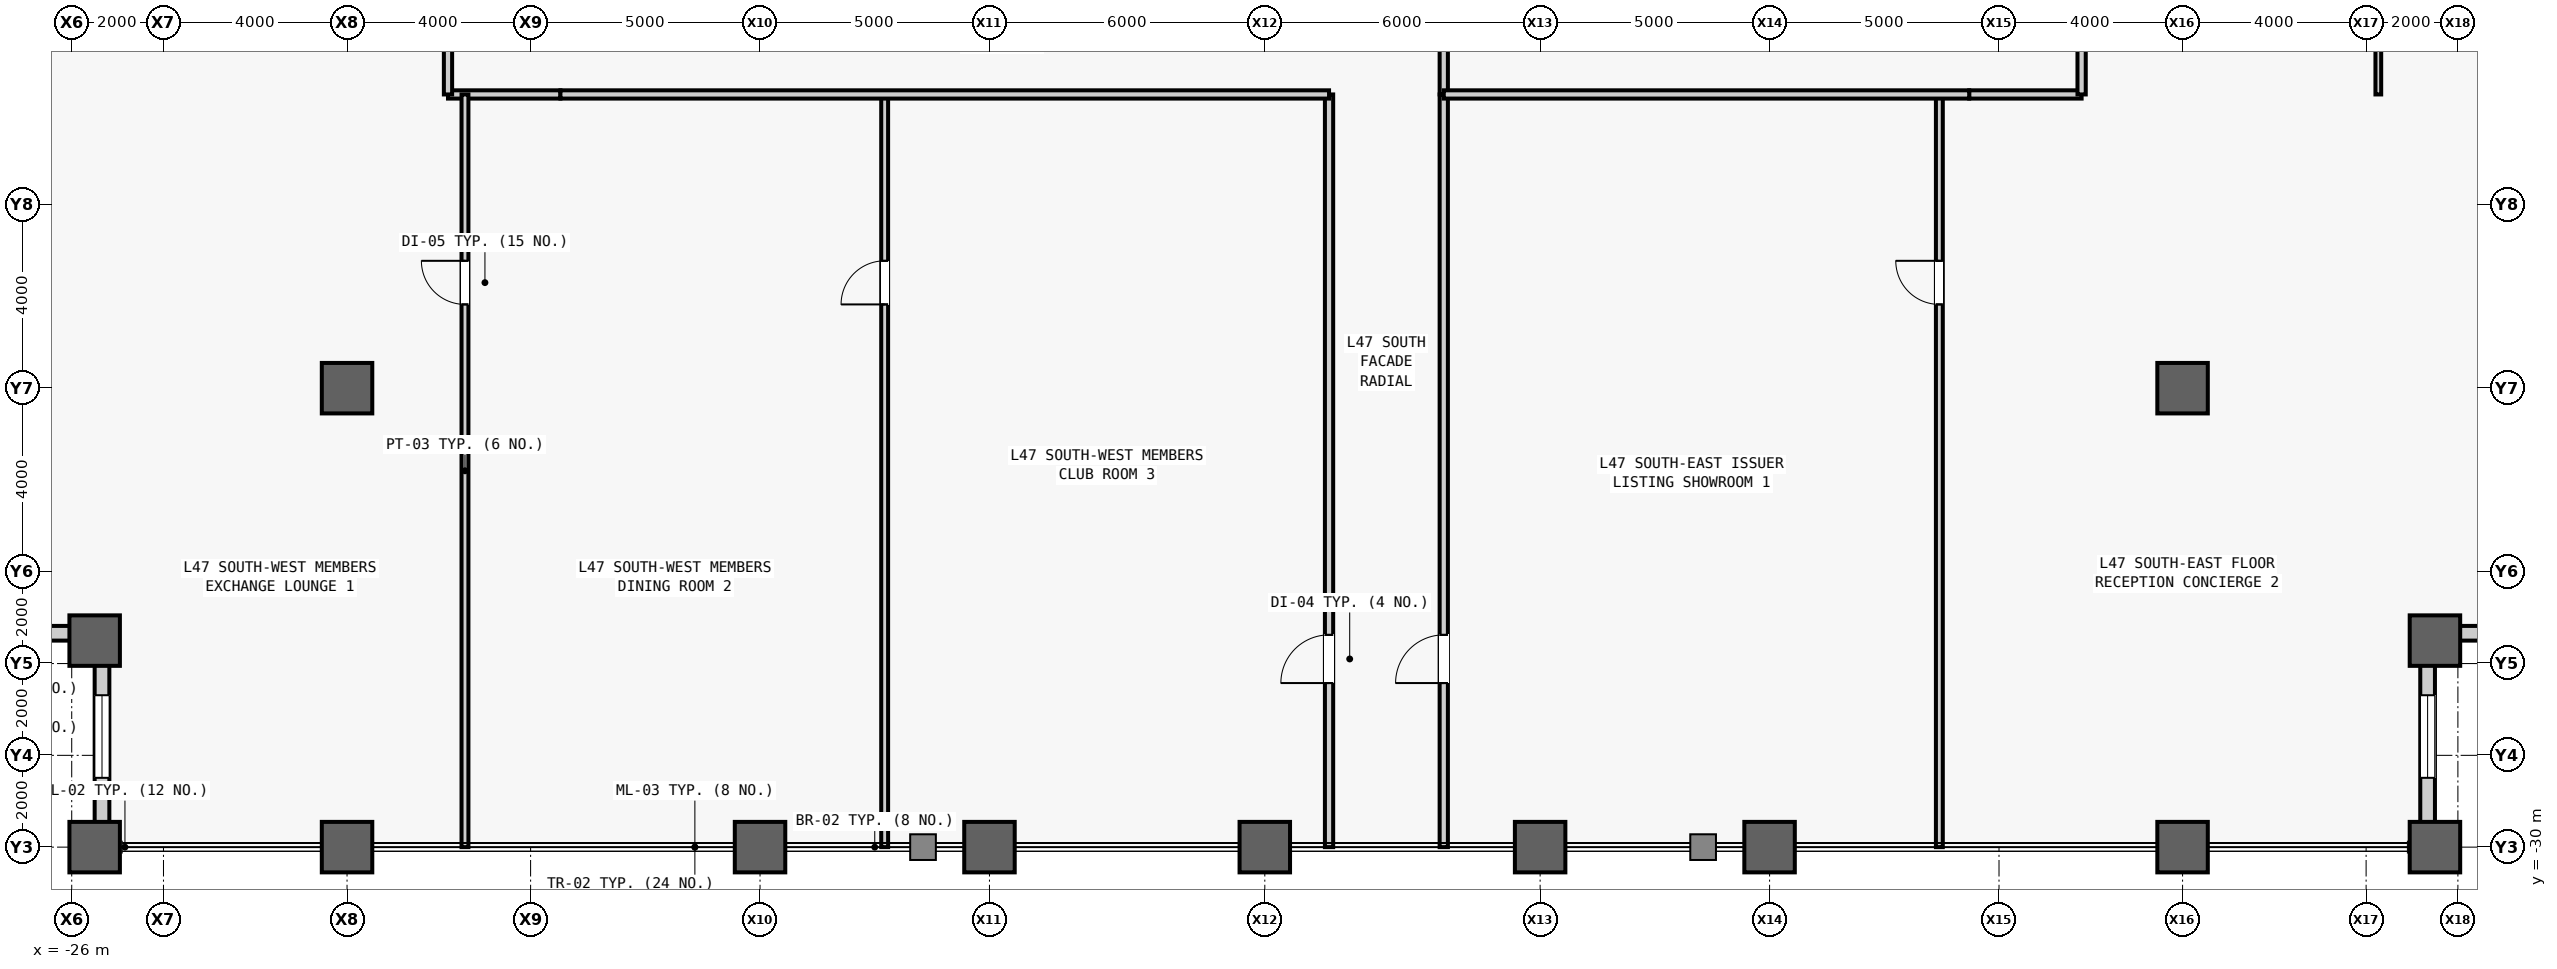
"""IFC4 building model, lengths in metres.
Left out: names, types, materials, properties, quantities, classifications, styles, units other than length and angle.
Written with IfcOpenShell. Run it as: python <this file> out.ifc"""

import sys

from ifc_helpers import new_model, si_unit, direction, frame, frame_2d, origin, origin_2d, place, context, subcontext, project, spatial, rectangle, hollow_rectangle, extrude, source, transform, mapped, element, fill, save


model = new_model("IFC4")
c1 = context("Model", 3, precision=1e-05, world=origin(), true_north=direction((0.0, 1.0)))
c2 = subcontext(c1, "Body", "Model", "MODEL_VIEW")
j1 = project(units=[si_unit("LENGTHUNIT", "METRE"), si_unit("PLANEANGLEUNIT", "RADIAN")], contexts=[c1])
p1 = place(None, origin())
s1 = spatial("IfcSite", under=j1, at=p1, CompositionType="ELEMENT")
p2 = place(p1, origin())
s2 = spatial("IfcBuilding", under=s1, at=p2, CompositionType="ELEMENT")
p3 = place(p2, frame((0.0, 0.0, 203.1)))
s3 = spatial("IfcBuildingStorey", under=s2, at=p3, CompositionType="ELEMENT", Elevation=203.1)
m1 = source(origin(), c2, "Body", "SweptSolid", [
    extrude(hollow_rectangle(XDim=1.1, YDim=1.1, WallThickness=0.06, at=origin_2d()), origin(), (0.0, 0.0, 1.0), 4.0),
])
for number, where, z_axis, x_axis in (
    (1, (-25.5, -30.0, 0.0), (0.0, 0.0, 1.0), (1.0, 0.0, 0.0)),
    (2, (-25.5, -25.5, 0.0), (0.0, 0.0, 1.0), (1.0, 0.0, 0.0)),
    (3, (-20.0, -30.0, 0.0), (0.0, 0.0, 1.0), (1.0, 0.0, 0.0)),
    (4, (-20.0, -20.0, 0.0), (0.0, 0.0, 1.0), (1.0, 0.0, 0.0)),
    (5, (-11.0, -30.0, 0.0), (0.0, 0.0, 1.0), (1.0, 0.0, 0.0)),
    (6, (-6.0, -30.0, 0.0), (0.0, 0.0, 1.0), (1.0, 0.0, 0.0)),
    (7, (0.0, -30.0, 0.0), (0.0, 0.0, 1.0), (1.0, 0.0, 0.0)),
    (8, (6.0, -30.0, 0.0), (0.0, 0.0, 1.0), (1.0, 0.0, 0.0)),
    (9, (11.0, -30.0, 0.0), (0.0, 0.0, 1.0), (1.0, 0.0, 0.0)),
    (10, (20.0, -30.0, 0.0), (0.0, 0.0, 1.0), (1.0, 0.0, 0.0)),
    (11, (20.0, -20.0, 0.0), (0.0, 0.0, 1.0), (1.0, 0.0, 0.0)),
    (12, (25.5, -30.0, 0.0), (0.0, 0.0, 1.0), (1.0, 0.0, 0.0)),
    (13, (25.5, -25.5, 0.0), (0.0, 0.0, 1.0), (1.0, 0.0, 0.0)),
):
    element("IfcColumn", number, at=place(p3, frame(where, z_axis=z_axis, x_axis=x_axis)), inside=s3, PredefinedType="COLUMN", context=c2, shape_type="MappedRepresentation", body=[
        mapped(m1, transform((0.0, 0.0, 0.0), scale=1.0)),
    ])
m2 = source(origin(), c2, "Body", "SweptSolid", [
    extrude(rectangle(XDim=4.18, YDim=0.32, at=frame_2d((2.09, 0.0))), origin(), (0.0, 0.0, 1.0), 3.164),
])
p4 = place(p3, frame((-25.5, -25.34, 0.0), z_axis=(0.0, 0.0, 1.0), x_axis=(-1.0, 0.0, 0.0)))
e14 = element("IfcWall", 14, at=p4, inside=s3, PredefinedType="STANDARD", context=c2, shape_type="MappedRepresentation", body=[
    mapped(m2, transform((0.0, 0.0, 0.0), scale=1.0)),
])
m3 = source(origin(), c2, "Body", "SweptSolid", [
    extrude(rectangle(XDim=1.8, YDim=2.4, at=frame_2d((0.9, 1.2))), frame((0.0, 0.17, 0.0), z_axis=(0.0, -1.0, 0.0), x_axis=(1.0, 0.0, 0.0)), (0.0, 0.0, 1.0), 0.34),
])
p5 = place(p4, frame((1.19, 0.0, 0.5)))
e15 = element("IfcOpeningElement", 15, at=p5, cuts=e14, PredefinedType="OPENING", context=c2, shape_type="MappedRepresentation", body=[
    mapped(m3, transform((0.0, 0.0, 0.0), scale=1.0)),
])
p6 = place(p3, frame((-25.34, -29.68, 0.0), z_axis=(0.0, 0.0, 1.0), x_axis=(0.0, 1.0, 0.0)))
e16 = element("IfcWall", 16, at=p6, inside=s3, PredefinedType="STANDARD", context=c2, shape_type="MappedRepresentation", body=[
    mapped(m2, transform((0.0, 0.0, 0.0), scale=1.0)),
])
p7 = place(p6, frame((1.19, 0.0, 0.5)))
e17 = element("IfcOpeningElement", 17, at=p7, cuts=e16, PredefinedType="OPENING", context=c2, shape_type="MappedRepresentation", body=[
    mapped(m3, transform((0.0, 0.0, 0.0), scale=1.0)),
])
p8 = place(p3, frame((25.34, -29.68, 0.0), z_axis=(0.0, 0.0, 1.0), x_axis=(0.0, 1.0, 0.0)))
e18 = element("IfcWall", 18, at=p8, inside=s3, PredefinedType="STANDARD", context=c2, shape_type="MappedRepresentation", body=[
    mapped(m2, transform((0.0, 0.0, 0.0), scale=1.0)),
])
p9 = place(p8, frame((1.19, 0.0, 0.5)))
e19 = element("IfcOpeningElement", 19, at=p9, cuts=e18, PredefinedType="OPENING", context=c2, shape_type="MappedRepresentation", body=[
    mapped(m3, transform((0.0, 0.0, 0.0), scale=1.0)),
])
p10 = place(p3, frame((25.5, -25.34, 0.0), z_axis=(0.0, 0.0, 1.0), x_axis=(1.0, 0.0, 0.0)))
e20 = element("IfcWall", 20, at=p10, inside=s3, PredefinedType="STANDARD", context=c2, shape_type="MappedRepresentation", body=[
    mapped(m2, transform((0.0, 0.0, 0.0), scale=1.0)),
])
p11 = place(p10, frame((1.19, 0.0, 0.5)))
e21 = element("IfcOpeningElement", 21, at=p11, cuts=e20, PredefinedType="OPENING", context=c2, shape_type="MappedRepresentation", body=[
    mapped(m3, transform((0.0, 0.0, 0.0), scale=1.0)),
])
m4 = source(origin(), c2, "Body", "SweptSolid", [
    extrude(rectangle(XDim=2.45, YDim=0.18, at=frame_2d((1.225, 0.0))), origin(), (0.0, 0.0, 1.0), 3.78),
])
for number, where, z_axis, x_axis in (
    (22, (15.35, -13.6, 0.0), (0.0, 0.0, 1.0), (1.0, 0.0, 0.0)),
    (23, (-17.8, -13.6, 0.0), (0.0, 0.0, 1.0), (1.0, 0.0, 0.0)),
):
    element("IfcWall", number, at=place(p3, frame(where, z_axis=z_axis, x_axis=x_axis)), inside=s3, PredefinedType="PARTITIONING", context=c2, shape_type="MappedRepresentation", body=[
        mapped(m4, transform((0.0, 0.0, 0.0), scale=1.0)),
    ])
m5 = source(origin(), c2, "Body", "SweptSolid", [
    extrude(rectangle(XDim=2.6, YDim=0.18, at=frame_2d((1.3, 0.0))), origin(), (0.0, 0.0, 1.0), 3.78),
])
p12 = place(p3, frame((3.9, -13.6, 0.0), z_axis=(0.0, 0.0, 1.0), x_axis=(0.0, 1.0, 0.0)))
e24 = element("IfcWall", 24, at=p12, inside=s3, PredefinedType="PARTITIONING", context=c2, shape_type="MappedRepresentation", body=[
    mapped(m5, transform((0.0, 0.0, 0.0), scale=1.0)),
])
m6 = source(origin(), c2, "Body", "SweptSolid", [
    extrude(rectangle(XDim=16.4, YDim=0.15, at=frame_2d((8.2, 0.0))), origin(), (0.0, 0.0, 1.0), 3.78),
])
p13 = place(p3, frame((-17.43, -30.0, 0.0), z_axis=(0.0, 0.0, 1.0), x_axis=(0.0, 1.0, 0.0)))
e25 = element("IfcWall", 25, at=p13, inside=s3, PredefinedType="PARTITIONING", context=c2, shape_type="MappedRepresentation", body=[
    mapped(m6, transform((0.0, 0.0, 0.0), scale=1.0)),
])
m7 = source(origin(), c2, "Body", "SweptSolid", [
    extrude(rectangle(XDim=0.95, YDim=2.15, at=frame_2d((0.475, 1.075))), frame((0.0, 0.085, 0.0), z_axis=(0.0, -1.0, 0.0), x_axis=(1.0, 0.0, 0.0)), (0.0, 0.0, 1.0), 0.17),
])
p14 = place(p13, frame((11.825, 0.0, 0.0)))
e26 = element("IfcOpeningElement", 26, at=p14, cuts=e25, PredefinedType="OPENING", context=c2, shape_type="MappedRepresentation", body=[
    mapped(m7, transform((0.0, 0.0, 0.0), scale=1.0)),
])
p15 = place(p3, frame((-8.284, -30.0, 0.0), z_axis=(0.0, 0.0, 1.0), x_axis=(0.0, 1.0, 0.0)))
e27 = element("IfcWall", 27, at=p15, inside=s3, PredefinedType="PARTITIONING", context=c2, shape_type="MappedRepresentation", body=[
    mapped(m6, transform((0.0, 0.0, 0.0), scale=1.0)),
])
p16 = place(p15, frame((11.825, 0.0, 0.0)))
e28 = element("IfcOpeningElement", 28, at=p16, cuts=e27, PredefinedType="OPENING", context=c2, shape_type="MappedRepresentation", body=[
    mapped(m7, transform((0.0, 0.0, 0.0), scale=1.0)),
])
m8 = source(origin(), c2, "Body", "SweptSolid", [
    extrude(rectangle(XDim=16.4, YDim=0.18, at=frame_2d((8.2, 0.0))), origin(), (0.0, 0.0, 1.0), 3.78),
])
p17 = place(p3, frame((1.4, -30.0, 0.0), z_axis=(0.0, 0.0, 1.0), x_axis=(0.0, 1.0, 0.0)))
e29 = element("IfcWall", 29, at=p17, inside=s3, PredefinedType="PARTITIONING", context=c2, shape_type="MappedRepresentation", body=[
    mapped(m8, transform((0.0, 0.0, 0.0), scale=1.0)),
])
m9 = source(origin(), c2, "Body", "SweptSolid", [
    extrude(rectangle(XDim=1.05, YDim=2.2, at=frame_2d((0.525, 1.1))), frame((0.0, 0.1, 0.0), z_axis=(0.0, -1.0, 0.0), x_axis=(1.0, 0.0, 0.0)), (0.0, 0.0, 1.0), 0.2),
])
p18 = place(p17, frame((3.575, 0.0, 0.0)))
e30 = element("IfcOpeningElement", 30, at=p18, cuts=e29, PredefinedType="OPENING", context=c2, shape_type="MappedRepresentation", body=[
    mapped(m9, transform((0.0, 0.0, 0.0), scale=1.0)),
])
m10 = source(origin(), c2, "Body", "SweptSolid", [
    extrude(rectangle(XDim=16.75, YDim=0.18, at=frame_2d((8.375, 0.0))), origin(), (0.0, 0.0, 1.0), 3.78),
])
p19 = place(p3, frame((-15.35, -13.6, 0.0), z_axis=(0.0, 0.0, 1.0), x_axis=(1.0, 0.0, 0.0)))
e31 = element("IfcWall", 31, at=p19, inside=s3, PredefinedType="PARTITIONING", context=c2, shape_type="MappedRepresentation", body=[
    mapped(m10, transform((0.0, 0.0, 0.0), scale=1.0)),
])
p20 = place(p3, frame((14.7, -30.0, 0.0), z_axis=(0.0, 0.0, 1.0), x_axis=(0.0, 1.0, 0.0)))
e32 = element("IfcWall", 32, at=p20, inside=s3, PredefinedType="PARTITIONING", context=c2, shape_type="MappedRepresentation", body=[
    mapped(m6, transform((0.0, 0.0, 0.0), scale=1.0)),
])
p21 = place(p20, frame((11.825, 0.0, 0.0)))
e33 = element("IfcOpeningElement", 33, at=p21, cuts=e32, PredefinedType="OPENING", context=c2, shape_type="MappedRepresentation", body=[
    mapped(m7, transform((0.0, 0.0, 0.0), scale=1.0)),
])
p22 = place(p3, frame((3.9, -30.0, 0.0), z_axis=(0.0, 0.0, 1.0), x_axis=(0.0, 1.0, 0.0)))
e34 = element("IfcWall", 34, at=p22, inside=s3, PredefinedType="PARTITIONING", context=c2, shape_type="MappedRepresentation", body=[
    mapped(m8, transform((0.0, 0.0, 0.0), scale=1.0)),
])
p23 = place(p22, frame((3.575, 0.0, 0.0)))
e35 = element("IfcOpeningElement", 35, at=p23, cuts=e34, PredefinedType="OPENING", context=c2, shape_type="MappedRepresentation", body=[
    mapped(m9, transform((0.0, 0.0, 0.0), scale=1.0)),
])
m11 = source(origin(), c2, "Body", "SweptSolid", [
    extrude(rectangle(XDim=11.45, YDim=0.18, at=frame_2d((5.725, 0.0))), origin(), (0.0, 0.0, 1.0), 3.78),
])
p24 = place(p3, frame((3.9, -13.6, 0.0), z_axis=(0.0, 0.0, 1.0), x_axis=(1.0, 0.0, 0.0)))
e36 = element("IfcWall", 36, at=p24, inside=s3, PredefinedType="PARTITIONING", context=c2, shape_type="MappedRepresentation", body=[
    mapped(m11, transform((0.0, 0.0, 0.0), scale=1.0)),
])
m12 = source(origin(), c2, "Body", "SweptSolid", [
    extrude(rectangle(XDim=11.6, YDim=0.18, at=frame_2d((5.8, 0.0))), origin(), (0.0, 0.0, 1.0), 3.78),
])
p25 = place(p3, frame((-17.8, -13.6, 0.0), z_axis=(0.0, 0.0, 1.0), x_axis=(0.0, 1.0, 0.0)))
e37 = element("IfcWall", 37, at=p25, inside=s3, PredefinedType="PARTITIONING", context=c2, shape_type="MappedRepresentation", body=[
    mapped(m12, transform((0.0, 0.0, 0.0), scale=1.0)),
])
m13 = source(origin(), c2, "Body", "SweptSolid", [
    extrude(rectangle(XDim=15.2, YDim=0.125, at=frame_2d((7.6, 0.0))), origin(), (0.0, 0.0, 1.0), 3.78),
])
p26 = place(p3, frame((24.266, -13.6, 0.0), z_axis=(0.0, 0.0, 1.0), x_axis=(0.0, 1.0, 0.0)))
e38 = element("IfcWall", 38, at=p26, inside=s3, PredefinedType="PARTITIONING", context=c2, shape_type="MappedRepresentation", body=[
    mapped(m13, transform((0.0, 0.0, 0.0), scale=1.0)),
])
m14 = source(origin(), c2, "Body", "SweptSolid", [
    extrude(rectangle(XDim=15.2, YDim=0.18, at=frame_2d((7.6, 0.0))), origin(), (0.0, 0.0, 1.0), 3.78),
])
p27 = place(p3, frame((17.8, -13.6, 0.0), z_axis=(0.0, 0.0, 1.0), x_axis=(0.0, 1.0, 0.0)))
e39 = element("IfcWall", 39, at=p27, inside=s3, PredefinedType="PARTITIONING", context=c2, shape_type="MappedRepresentation", body=[
    mapped(m14, transform((0.0, 0.0, 0.0), scale=1.0)),
])
m15 = source(origin(), c2, "Body", "SweptSolid", [
    extrude(rectangle(XDim=1.8, YDim=2.4, at=frame_2d((0.9, 1.2))), frame((0.0, 0.03, 0.0), z_axis=(0.0, -1.0, 0.0), x_axis=(1.0, 0.0, 0.0)), (0.0, 0.0, 1.0), 0.06),
])
p28 = place(p7, origin())
e40 = element("IfcWindow", 40, at=p28, inside=s3, PartitioningType="SINGLE_PANEL", PredefinedType="WINDOW", context=c2, shape_type="MappedRepresentation", body=[
    mapped(m15, transform((0.0, 0.0, 0.0), scale=1.0)),
])
fill(e17, e40)
p29 = place(p9, origin())
e41 = element("IfcWindow", 41, at=p29, inside=s3, PartitioningType="SINGLE_PANEL", PredefinedType="WINDOW", context=c2, shape_type="MappedRepresentation", body=[
    mapped(m15, transform((0.0, 0.0, 0.0), scale=1.0)),
])
fill(e19, e41)
m16 = source(origin(), c2, "Body", "SweptSolid", [
    extrude(rectangle(XDim=0.95, YDim=2.15, at=frame_2d((0.475, 1.075))), frame((0.0, 0.025, 0.0), z_axis=(0.0, -1.0, 0.0), x_axis=(1.0, 0.0, 0.0)), (0.0, 0.0, 1.0), 0.05),
])
p30 = place(p14, origin())
e42 = element("IfcDoor", 42, at=p30, inside=s3, OperationType="SINGLE_SWING_RIGHT", PredefinedType="DOOR", context=c2, shape_type="MappedRepresentation", body=[
    mapped(m16, transform((0.0, 0.0, 0.0), scale=1.0)),
])
fill(e26, e42)
p31 = place(p16, origin())
e43 = element("IfcDoor", 43, at=p31, inside=s3, OperationType="SINGLE_SWING_LEFT", PredefinedType="DOOR", context=c2, shape_type="MappedRepresentation", body=[
    mapped(m16, transform((0.0, 0.0, 0.0), scale=1.0)),
])
fill(e28, e43)
m17 = source(origin(), c2, "Body", "SweptSolid", [
    extrude(rectangle(XDim=1.05, YDim=2.2, at=frame_2d((0.525, 1.1))), frame((0.0, 0.025, 0.0), z_axis=(0.0, -1.0, 0.0), x_axis=(1.0, 0.0, 0.0)), (0.0, 0.0, 1.0), 0.05),
])
p32 = place(p18, origin())
e44 = element("IfcDoor", 44, at=p32, inside=s3, OperationType="SINGLE_SWING_LEFT", PredefinedType="DOOR", context=c2, shape_type="MappedRepresentation", body=[
    mapped(m17, transform((0.0, 0.0, 0.0), scale=1.0)),
])
fill(e30, e44)
p33 = place(p21, origin())
e45 = element("IfcDoor", 45, at=p33, inside=s3, OperationType="SINGLE_SWING_RIGHT", PredefinedType="DOOR", context=c2, shape_type="MappedRepresentation", body=[
    mapped(m16, transform((0.0, 0.0, 0.0), scale=1.0)),
])
fill(e33, e45)
p34 = place(p23, origin())
e46 = element("IfcDoor", 46, at=p34, inside=s3, OperationType="SINGLE_SWING_LEFT", PredefinedType="DOOR", context=c2, shape_type="MappedRepresentation", body=[
    mapped(m17, transform((0.0, 0.0, 0.0), scale=1.0)),
])
fill(e35, e46)
save(model, sys.argv[1])
